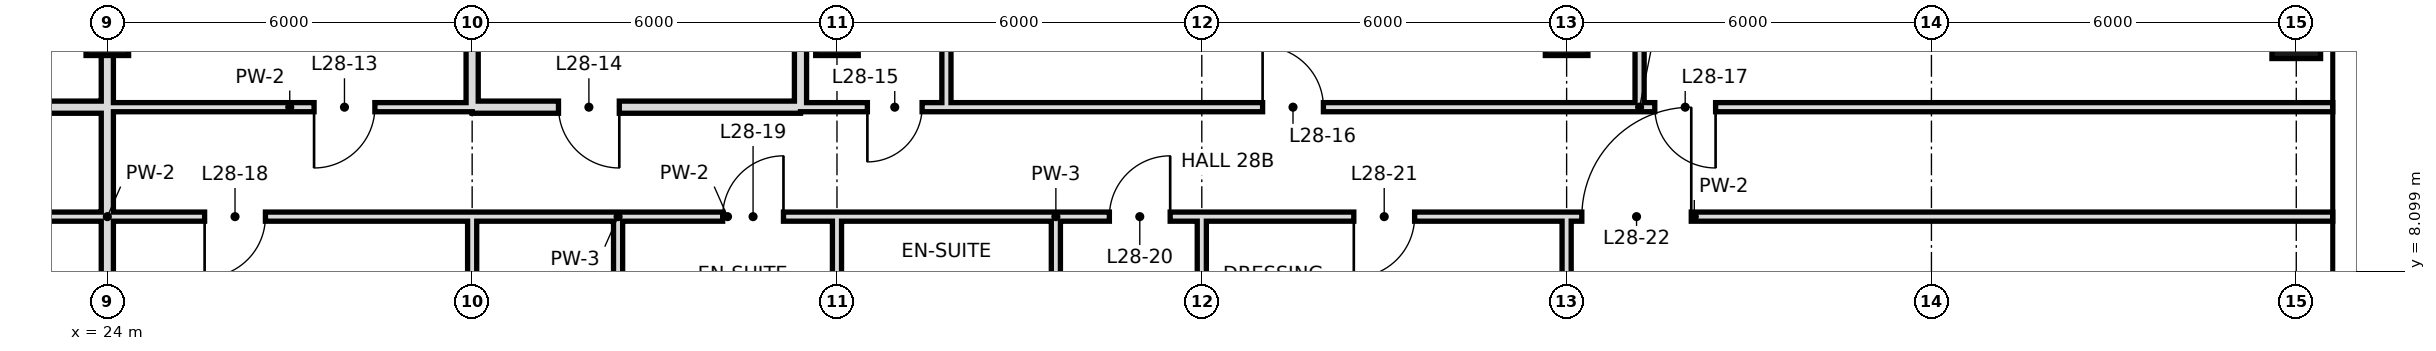
"""IFC4 building model, lengths in metres.
Left out: names, types, materials, properties, quantities, classifications, styles, units other than length and angle.
Written with IfcOpenShell. Run it as: python <this file> out.ifc"""

import sys

from ifc_helpers import new_model, si_unit, direction, frame, frame_2d, origin, origin_2d, place, context, subcontext, project, spatial, rectangle, hollow_rectangle, extrude, element, fill, save


model = new_model("IFC4")
c1 = context("Model", 3, precision=1e-05, world=origin(), true_north=direction((0.0, 1.0)))
c2 = subcontext(c1, "Body", "Model", "MODEL_VIEW")
j1 = project(units=[si_unit("LENGTHUNIT", "METRE"), si_unit("PLANEANGLEUNIT", "RADIAN")], contexts=[c1])
p1 = place(None, origin())
s1 = spatial("IfcSite", under=j1, at=p1, CompositionType="ELEMENT")
p2 = place(p1, origin())
s2 = spatial("IfcBuilding", under=s1, at=p2, CompositionType="ELEMENT")
p3 = place(p2, frame((0.0, 0.0, 126.8)))
s3 = spatial("IfcBuildingStorey", under=s2, at=p3, CompositionType="ELEMENT", Elevation=126.8)
for number, where, z_axis, x_axis in (
    (1, (24.0, 12.0, 0.0), (0.0, 0.0, 1.0), (1.0, 0.0, 0.0)),
    (2, (36.0, 12.0, 0.0), (0.0, 0.0, 1.0), (1.0, 0.0, 0.0)),
    (3, (48.0, 12.0, 0.0), (0.0, 0.0, 1.0), (1.0, 0.0, 0.0)),
):
    element("IfcColumn", number, at=place(p3, frame(where, z_axis=z_axis, x_axis=x_axis)), inside=s3, PredefinedType="COLUMN", context=c2, shape_type="SweptSolid", body=[
        extrude(hollow_rectangle(XDim=0.7, YDim=0.7, WallThickness=0.036, at=origin_2d()), origin(), (0.0, 0.0, 1.0), 3.6),
    ])
p4 = place(p3, frame((60.0, 12.0, 0.0), z_axis=(0.0, 0.0, 1.0), x_axis=(1.0, 0.0, 0.0)))
e4 = element("IfcColumn", 4, at=p4, inside=s3, PredefinedType="COLUMN", context=c2, shape_type="SweptSolid", body=[
    extrude(hollow_rectangle(XDim=0.8, YDim=0.8, WallThickness=0.04, at=origin_2d()), origin(), (0.0, 0.0, 1.0), 3.6),
])
p5 = place(p3, frame((24.0, 10.8, 0.0), z_axis=(0.0, 0.0, 1.0), x_axis=(0.0, 1.0, 0.0)))
e5 = element("IfcWall", 5, at=p5, inside=s3, PredefinedType="SOLIDWALL", context=c2, shape_type="SweptSolid", body=[
    extrude(rectangle(XDim=7.9, YDim=0.2, at=frame_2d((3.95, 0.0))), origin(), (0.0, 0.0, 1.0), 2.72),
])
p6 = place(p3, frame((24.0, 0.0, 0.0), z_axis=(0.0, 0.0, 1.0), x_axis=(0.0, 1.0, 0.0)))
e6 = element("IfcWall", 6, at=p6, inside=s3, PredefinedType="SOLIDWALL", context=c2, shape_type="SweptSolid", body=[
    extrude(rectangle(XDim=10.8, YDim=0.2, at=frame_2d((5.4, 0.0))), origin(), (0.0, 0.0, 1.0), 2.72),
])
p7 = place(p3, frame((30.0, 10.8, 0.0), z_axis=(0.0, 0.0, 1.0), x_axis=(0.0, 1.0, 0.0)))
e7 = element("IfcWall", 7, at=p7, inside=s3, PredefinedType="SOLIDWALL", context=c2, shape_type="SweptSolid", body=[
    extrude(rectangle(XDim=7.9, YDim=0.2, at=frame_2d((3.95, 0.0))), origin(), (0.0, 0.0, 1.0), 2.72),
])
p8 = place(p3, frame((30.0, 6.0, 0.0), z_axis=(0.0, 0.0, 1.0), x_axis=(0.0, 1.0, 0.0)))
e8 = element("IfcWall", 8, at=p8, inside=s3, PredefinedType="PARTITIONING", context=c2, shape_type="SweptSolid", body=[
    extrude(rectangle(XDim=3.0, YDim=0.15, at=frame_2d((1.5, 0.0))), origin(), (0.0, 0.0, 1.0), 2.72),
])
p9 = place(p3, frame((32.4, 6.0, 0.0), z_axis=(0.0, 0.0, 1.0), x_axis=(0.0, 1.0, 0.0)))
e9 = element("IfcWall", 9, at=p9, inside=s3, PredefinedType="PARTITIONING", context=c2, shape_type="SweptSolid", body=[
    extrude(rectangle(XDim=3.0, YDim=0.15, at=frame_2d((1.5, 0.0))), origin(), (0.0, 0.0, 1.0), 3.42),
])
p10 = place(p3, frame((35.4, 10.8, 0.0), z_axis=(0.0, 0.0, 1.0), x_axis=(0.0, 1.0, 0.0)))
e10 = element("IfcWall", 10, at=p10, inside=s3, PredefinedType="SOLIDWALL", context=c2, shape_type="SweptSolid", body=[
    extrude(rectangle(XDim=7.9, YDim=0.2, at=frame_2d((3.95, 0.0))), origin(), (0.0, 0.0, 1.0), 2.72),
])
p11 = place(p3, frame((36.0, 6.0, 0.0), z_axis=(0.0, 0.0, 1.0), x_axis=(0.0, 1.0, 0.0)))
e11 = element("IfcWall", 11, at=p11, inside=s3, PredefinedType="PARTITIONING", context=c2, shape_type="SweptSolid", body=[
    extrude(rectangle(XDim=3.0, YDim=0.15, at=frame_2d((1.5, 0.0))), origin(), (0.0, 0.0, 1.0), 2.72),
])
p12 = place(p3, frame((37.8, 10.8, 0.0), z_axis=(0.0, 0.0, 1.0), x_axis=(0.0, 1.0, 0.0)))
e12 = element("IfcWall", 12, at=p12, inside=s3, PredefinedType="PARTITIONING", context=c2, shape_type="SweptSolid", body=[
    extrude(rectangle(XDim=7.9, YDim=0.15, at=frame_2d((3.95, 0.0))), origin(), (0.0, 0.0, 1.0), 3.42),
])
p13 = place(p3, frame((39.6, 6.0, 0.0), z_axis=(0.0, 0.0, 1.0), x_axis=(0.0, 1.0, 0.0)))
e13 = element("IfcWall", 13, at=p13, inside=s3, PredefinedType="PARTITIONING", context=c2, shape_type="SweptSolid", body=[
    extrude(rectangle(XDim=3.0, YDim=0.15, at=frame_2d((1.5, 0.0))), origin(), (0.0, 0.0, 1.0), 3.42),
])
p14 = place(p3, frame((42.0, -0.6, 0.0), z_axis=(0.0, 0.0, 1.0), x_axis=(0.0, 1.0, 0.0)))
e14 = element("IfcWall", 14, at=p14, inside=s3, PredefinedType="PARTITIONING", context=c2, shape_type="SweptSolid", body=[
    extrude(rectangle(XDim=9.6, YDim=0.15, at=frame_2d((4.8, 0.0))), origin(), (0.0, 0.0, 1.0), 2.72),
])
p15 = place(p3, frame((48.0, 0.0, 0.0), z_axis=(0.0, 0.0, 1.0), x_axis=(0.0, 1.0, 0.0)))
e15 = element("IfcWall", 15, at=p15, inside=s3, PredefinedType="PARTITIONING", context=c2, shape_type="SweptSolid", body=[
    extrude(rectangle(XDim=9.0, YDim=0.15, at=frame_2d((4.5, 0.0))), origin(), (0.0, 0.0, 1.0), 2.72),
])
p16 = place(p3, frame((49.2, 10.8, 0.0), z_axis=(0.0, 0.0, 1.0), x_axis=(0.0, 1.0, 0.0)))
e16 = element("IfcWall", 16, at=p16, inside=s3, PredefinedType="PARTITIONING", context=c2, shape_type="SweptSolid", body=[
    extrude(rectangle(XDim=20.4, YDim=0.15, at=frame_2d((10.2, 0.0))), origin(), (0.0, 0.0, 1.0), 3.42),
])
p17 = place(p16, frame((17.68, 0.0, 0.0)))
e17 = element("IfcOpeningElement", 17, at=p17, cuts=e16, PredefinedType="OPENING", context=c2, shape_type="SweptSolid", body=[
    extrude(rectangle(XDim=1.0, YDim=2.4, at=frame_2d((0.5, 1.2))), frame((0.0, 0.085, 0.0), z_axis=(0.0, -1.0, 0.0), x_axis=(1.0, 0.0, 0.0)), (0.0, 0.0, 1.0), 0.17),
])
p18 = place(p16, frame((9.88, 0.0, 0.0)))
e18 = element("IfcOpeningElement", 18, at=p18, cuts=e16, PredefinedType="OPENING", context=c2, shape_type="SweptSolid", body=[
    extrude(rectangle(XDim=1.0, YDim=2.4, at=frame_2d((0.5, 1.2))), frame((0.0, 0.085, 0.0), z_axis=(0.0, -1.0, 0.0), x_axis=(1.0, 0.0, 0.0)), (0.0, 0.0, 1.0), 0.17),
])
p19 = place(p3, frame((18.6, 10.8, 0.0), z_axis=(0.0, 0.0, 1.0), x_axis=(1.0, 0.0, 0.0)))
e19 = element("IfcWall", 19, at=p19, inside=s3, PredefinedType="SOLIDWALL", context=c2, shape_type="SweptSolid", body=[
    extrude(rectangle(XDim=5.4, YDim=0.2, at=frame_2d((2.7, 0.0))), origin(), (0.0, 0.0, 1.0), 2.72),
])
p20 = place(p19, frame((2.2, 0.0, 0.0)))
e20 = element("IfcOpeningElement", 20, at=p20, cuts=e19, PredefinedType="OPENING", context=c2, shape_type="SweptSolid", body=[
    extrude(rectangle(XDim=1.0, YDim=2.4, at=frame_2d((0.5, 1.2))), frame((0.0, 0.11, 0.0), z_axis=(0.0, -1.0, 0.0), x_axis=(1.0, 0.0, 0.0)), (0.0, 0.0, 1.0), 0.22),
])
p21 = place(p3, frame((30.0, 10.8, 0.0), z_axis=(0.0, 0.0, 1.0), x_axis=(1.0, 0.0, 0.0)))
e21 = element("IfcWall", 21, at=p21, inside=s3, PredefinedType="SOLIDWALL", context=c2, shape_type="SweptSolid", body=[
    extrude(rectangle(XDim=5.4, YDim=0.2, at=frame_2d((2.7, 0.0))), origin(), (0.0, 0.0, 1.0), 2.72),
])
p22 = place(p21, frame((1.42, 0.0, 0.0)))
e22 = element("IfcOpeningElement", 22, at=p22, cuts=e21, PredefinedType="OPENING", context=c2, shape_type="SweptSolid", body=[
    extrude(rectangle(XDim=1.0, YDim=2.4, at=frame_2d((0.5, 1.2))), frame((0.0, 0.11, 0.0), z_axis=(0.0, -1.0, 0.0), x_axis=(1.0, 0.0, 0.0)), (0.0, 0.0, 1.0), 0.22),
])
p23 = place(p3, frame((24.0, 10.8, 0.0), z_axis=(0.0, 0.0, 1.0), x_axis=(1.0, 0.0, 0.0)))
e23 = element("IfcWall", 23, at=p23, inside=s3, PredefinedType="PARTITIONING", context=c2, shape_type="SweptSolid", body=[
    extrude(rectangle(XDim=6.0, YDim=0.15, at=frame_2d((3.0, 0.0))), origin(), (0.0, 0.0, 1.0), 3.42),
])
p24 = place(p23, frame((3.4, 0.0, 0.0)))
e24 = element("IfcOpeningElement", 24, at=p24, cuts=e23, PredefinedType="OPENING", context=c2, shape_type="SweptSolid", body=[
    extrude(rectangle(XDim=1.0, YDim=2.4, at=frame_2d((0.5, 1.2))), frame((0.0, 0.085, 0.0), z_axis=(0.0, -1.0, 0.0), x_axis=(1.0, 0.0, 0.0)), (0.0, 0.0, 1.0), 0.17),
])
p25 = place(p3, frame((37.8, 10.8, 0.0), z_axis=(0.0, 0.0, 1.0), x_axis=(1.0, 0.0, 0.0)))
e25 = element("IfcWall", 25, at=p25, inside=s3, PredefinedType="PARTITIONING", context=c2, shape_type="SweptSolid", body=[
    extrude(rectangle(XDim=22.8, YDim=0.15, at=frame_2d((11.4, 0.0))), origin(), (0.0, 0.0, 1.0), 3.42),
])
p26 = place(p25, frame((5.2, 0.0, 0.0)))
e26 = element("IfcOpeningElement", 26, at=p26, cuts=e25, PredefinedType="OPENING", context=c2, shape_type="SweptSolid", body=[
    extrude(rectangle(XDim=1.0, YDim=2.4, at=frame_2d((0.5, 1.2))), frame((0.0, 0.085, 0.0), z_axis=(0.0, -1.0, 0.0), x_axis=(1.0, 0.0, 0.0)), (0.0, 0.0, 1.0), 0.17),
])
p27 = place(p25, frame((11.65, 0.0, 0.0)))
e27 = element("IfcOpeningElement", 27, at=p27, cuts=e25, PredefinedType="OPENING", context=c2, shape_type="SweptSolid", body=[
    extrude(rectangle(XDim=1.0, YDim=2.4, at=frame_2d((0.5, 1.2))), frame((0.0, 0.085, 0.0), z_axis=(0.0, -1.0, 0.0), x_axis=(1.0, 0.0, 0.0)), (0.0, 0.0, 1.0), 0.17),
])
p28 = place(p3, frame((35.4, 10.8, 0.0), z_axis=(0.0, 0.0, 1.0), x_axis=(1.0, 0.0, 0.0)))
e28 = element("IfcWall", 28, at=p28, inside=s3, PredefinedType="PARTITIONING", context=c2, shape_type="SweptSolid", body=[
    extrude(rectangle(XDim=2.4, YDim=0.15, at=frame_2d((1.2, 0.0))), origin(), (0.0, 0.0, 1.0), 3.42),
])
p29 = place(p28, frame((1.1, 0.0, 0.0)))
e29 = element("IfcOpeningElement", 29, at=p29, cuts=e28, PredefinedType="OPENING", context=c2, shape_type="SweptSolid", body=[
    extrude(rectangle(XDim=0.9, YDim=2.4, at=frame_2d((0.45, 1.2))), frame((0.0, 0.085, 0.0), z_axis=(0.0, -1.0, 0.0), x_axis=(1.0, 0.0, 0.0)), (0.0, 0.0, 1.0), 0.17),
])
p30 = place(p3, frame((18.0, 9.0, 0.0), z_axis=(0.0, 0.0, 1.0), x_axis=(1.0, 0.0, 0.0)))
e30 = element("IfcWall", 30, at=p30, inside=s3, PredefinedType="PARTITIONING", context=c2, shape_type="SweptSolid", body=[
    extrude(rectangle(XDim=12.0, YDim=0.15, at=frame_2d((6.0, 0.0))), origin(), (0.0, 0.0, 1.0), 3.42),
])
p31 = place(p30, frame((2.1, 0.0, 0.0)))
e31 = element("IfcOpeningElement", 31, at=p31, cuts=e30, PredefinedType="OPENING", context=c2, shape_type="SweptSolid", body=[
    extrude(rectangle(XDim=1.8, YDim=2.4, at=frame_2d((0.9, 1.2))), frame((0.0, 0.085, 0.0), z_axis=(0.0, -1.0, 0.0), x_axis=(1.0, 0.0, 0.0)), (0.0, 0.0, 1.0), 0.17),
])
p32 = place(p30, frame((7.6, 0.0, 0.0)))
e32 = element("IfcOpeningElement", 32, at=p32, cuts=e30, PredefinedType="OPENING", context=c2, shape_type="SweptSolid", body=[
    extrude(rectangle(XDim=1.0, YDim=2.4, at=frame_2d((0.5, 1.2))), frame((0.0, 0.085, 0.0), z_axis=(0.0, -1.0, 0.0), x_axis=(1.0, 0.0, 0.0)), (0.0, 0.0, 1.0), 0.17),
])
p33 = place(p3, frame((32.4, 9.0, 0.0), z_axis=(0.0, 0.0, 1.0), x_axis=(1.0, 0.0, 0.0)))
e33 = element("IfcWall", 33, at=p33, inside=s3, PredefinedType="PARTITIONING", context=c2, shape_type="SweptSolid", body=[
    extrude(rectangle(XDim=3.6, YDim=0.15, at=frame_2d((1.8, 0.0))), origin(), (0.0, 0.0, 1.0), 3.42),
])
p34 = place(p33, frame((1.72, 0.0, 0.0)))
e34 = element("IfcOpeningElement", 34, at=p34, cuts=e33, PredefinedType="OPENING", context=c2, shape_type="SweptSolid", body=[
    extrude(rectangle(XDim=1.0, YDim=2.4, at=frame_2d((0.5, 1.2))), frame((0.0, 0.085, 0.0), z_axis=(0.0, -1.0, 0.0), x_axis=(1.0, 0.0, 0.0)), (0.0, 0.0, 1.0), 0.17),
])
p35 = place(p3, frame((39.6, 9.0, 0.0), z_axis=(0.0, 0.0, 1.0), x_axis=(1.0, 0.0, 0.0)))
e35 = element("IfcWall", 35, at=p35, inside=s3, PredefinedType="PARTITIONING", context=c2, shape_type="SweptSolid", body=[
    extrude(rectangle(XDim=21.0, YDim=0.15, at=frame_2d((10.5, 0.0))), origin(), (0.0, 0.0, 1.0), 3.42),
])
p36 = place(p35, frame((0.88, 0.0, 0.0)))
e36 = element("IfcOpeningElement", 36, at=p36, cuts=e35, PredefinedType="OPENING", context=c2, shape_type="SweptSolid", body=[
    extrude(rectangle(XDim=1.0, YDim=2.4, at=frame_2d((0.5, 1.2))), frame((0.0, 0.085, 0.0), z_axis=(0.0, -1.0, 0.0), x_axis=(1.0, 0.0, 0.0)), (0.0, 0.0, 1.0), 0.17),
])
p37 = place(p35, frame((4.9, 0.0, 0.0)))
e37 = element("IfcOpeningElement", 37, at=p37, cuts=e35, PredefinedType="OPENING", context=c2, shape_type="SweptSolid", body=[
    extrude(rectangle(XDim=1.0, YDim=2.4, at=frame_2d((0.5, 1.2))), frame((0.0, 0.085, 0.0), z_axis=(0.0, -1.0, 0.0), x_axis=(1.0, 0.0, 0.0)), (0.0, 0.0, 1.0), 0.17),
])
p38 = place(p35, frame((8.65, 0.0, 0.0)))
e38 = element("IfcOpeningElement", 38, at=p38, cuts=e35, PredefinedType="OPENING", context=c2, shape_type="SweptSolid", body=[
    extrude(rectangle(XDim=1.8, YDim=2.4, at=frame_2d((0.9, 1.2))), frame((0.0, 0.085, 0.0), z_axis=(0.0, -1.0, 0.0), x_axis=(1.0, 0.0, 0.0)), (0.0, 0.0, 1.0), 0.17),
])
p39 = place(p3, frame((30.0, 9.0, 0.0), z_axis=(0.0, 0.0, 1.0), x_axis=(1.0, 0.0, 0.0)))
e39 = element("IfcWall", 39, at=p39, inside=s3, PredefinedType="PARTITIONING", context=c2, shape_type="SweptSolid", body=[
    extrude(rectangle(XDim=2.4, YDim=0.15, at=frame_2d((1.2, 0.0))), origin(), (0.0, 0.0, 1.0), 3.42),
])
p40 = place(p3, frame((36.0, 9.0, 0.0), z_axis=(0.0, 0.0, 1.0), x_axis=(1.0, 0.0, 0.0)))
e40 = element("IfcWall", 40, at=p40, inside=s3, PredefinedType="PARTITIONING", context=c2, shape_type="SweptSolid", body=[
    extrude(rectangle(XDim=3.6, YDim=0.15, at=frame_2d((1.8, 0.0))), origin(), (0.0, 0.0, 1.0), 3.42),
])
p41 = place(p24, frame((1.0, 0.0, 0.0), z_axis=(0.0, 0.0, 1.0), x_axis=(-1.0, 0.0, 0.0)))
e41 = element("IfcDoor", 41, at=p41, inside=s3, OperationType="SINGLE_SWING_RIGHT", PredefinedType="DOOR", context=c2, shape_type="SweptSolid", body=[
    extrude(rectangle(XDim=1.0, YDim=2.4, at=frame_2d((0.5, 1.2))), frame((0.0, 0.025, 0.0), z_axis=(0.0, -1.0, 0.0), x_axis=(1.0, 0.0, 0.0)), (0.0, 0.0, 1.0), 0.05),
])
fill(e24, e41)
p42 = place(p22, origin())
e42 = element("IfcDoor", 42, at=p42, inside=s3, OperationType="SINGLE_SWING_RIGHT", PredefinedType="DOOR", context=c2, shape_type="SweptSolid", body=[
    extrude(rectangle(XDim=1.0, YDim=2.4, at=frame_2d((0.5, 1.2))), frame((0.0, 0.025, 0.0), z_axis=(0.0, -1.0, 0.0), x_axis=(1.0, 0.0, 0.0)), (0.0, 0.0, 1.0), 0.05),
])
fill(e22, e42)
p43 = place(p29, frame((0.9, 0.0, 0.0), z_axis=(0.0, 0.0, 1.0), x_axis=(-1.0, 0.0, 0.0)))
e43 = element("IfcDoor", 43, at=p43, inside=s3, OperationType="SINGLE_SWING_RIGHT", PredefinedType="DOOR", context=c2, shape_type="SweptSolid", body=[
    extrude(rectangle(XDim=0.9, YDim=2.4, at=frame_2d((0.45, 1.2))), frame((0.0, 0.025, 0.0), z_axis=(0.0, -1.0, 0.0), x_axis=(1.0, 0.0, 0.0)), (0.0, 0.0, 1.0), 0.05),
])
fill(e29, e43)
p44 = place(p26, origin())
e44 = element("IfcDoor", 44, at=p44, inside=s3, OperationType="SINGLE_SWING_LEFT", PredefinedType="DOOR", context=c2, shape_type="SweptSolid", body=[
    extrude(rectangle(XDim=1.0, YDim=2.4, at=frame_2d((0.5, 1.2))), frame((0.0, 0.025, 0.0), z_axis=(0.0, -1.0, 0.0), x_axis=(1.0, 0.0, 0.0)), (0.0, 0.0, 1.0), 0.05),
])
fill(e26, e44)
p45 = place(p27, origin())
e45 = element("IfcDoor", 45, at=p45, inside=s3, OperationType="SINGLE_SWING_RIGHT", PredefinedType="DOOR", context=c2, shape_type="SweptSolid", body=[
    extrude(rectangle(XDim=1.0, YDim=2.4, at=frame_2d((0.5, 1.2))), frame((0.0, 0.025, 0.0), z_axis=(0.0, -1.0, 0.0), x_axis=(1.0, 0.0, 0.0)), (0.0, 0.0, 1.0), 0.05),
])
fill(e27, e45)
p46 = place(p32, frame((1.0, 0.0, 0.0), z_axis=(0.0, 0.0, 1.0), x_axis=(-1.0, 0.0, 0.0)))
e46 = element("IfcDoor", 46, at=p46, inside=s3, OperationType="SINGLE_SWING_RIGHT", PredefinedType="DOOR", context=c2, shape_type="SweptSolid", body=[
    extrude(rectangle(XDim=1.0, YDim=2.4, at=frame_2d((0.5, 1.2))), frame((0.0, 0.025, 0.0), z_axis=(0.0, -1.0, 0.0), x_axis=(1.0, 0.0, 0.0)), (0.0, 0.0, 1.0), 0.05),
])
fill(e32, e46)
p47 = place(p34, frame((1.0, 0.0, 0.0), z_axis=(0.0, 0.0, 1.0), x_axis=(-1.0, 0.0, 0.0)))
e47 = element("IfcDoor", 47, at=p47, inside=s3, OperationType="SINGLE_SWING_LEFT", PredefinedType="DOOR", context=c2, shape_type="SweptSolid", body=[
    extrude(rectangle(XDim=1.0, YDim=2.4, at=frame_2d((0.5, 1.2))), frame((0.0, 0.025, 0.0), z_axis=(0.0, -1.0, 0.0), x_axis=(1.0, 0.0, 0.0)), (0.0, 0.0, 1.0), 0.05),
])
fill(e34, e47)
p48 = place(p36, frame((1.0, 0.0, 0.0), z_axis=(0.0, 0.0, 1.0), x_axis=(-1.0, 0.0, 0.0)))
e48 = element("IfcDoor", 48, at=p48, inside=s3, OperationType="SINGLE_SWING_LEFT", PredefinedType="DOOR", context=c2, shape_type="SweptSolid", body=[
    extrude(rectangle(XDim=1.0, YDim=2.4, at=frame_2d((0.5, 1.2))), frame((0.0, 0.025, 0.0), z_axis=(0.0, -1.0, 0.0), x_axis=(1.0, 0.0, 0.0)), (0.0, 0.0, 1.0), 0.05),
])
fill(e36, e48)
p49 = place(p37, frame((1.0, 0.0, 0.0), z_axis=(0.0, 0.0, 1.0), x_axis=(-1.0, 0.0, 0.0)))
e49 = element("IfcDoor", 49, at=p49, inside=s3, OperationType="SINGLE_SWING_RIGHT", PredefinedType="DOOR", context=c2, shape_type="SweptSolid", body=[
    extrude(rectangle(XDim=1.0, YDim=2.4, at=frame_2d((0.5, 1.2))), frame((0.0, 0.025, 0.0), z_axis=(0.0, -1.0, 0.0), x_axis=(1.0, 0.0, 0.0)), (0.0, 0.0, 1.0), 0.05),
])
fill(e37, e49)
p50 = place(p38, frame((1.8, 0.0, 0.0), z_axis=(0.0, 0.0, 1.0), x_axis=(-1.0, 0.0, 0.0)))
e50 = element("IfcDoor", 50, at=p50, inside=s3, OperationType="SINGLE_SWING_LEFT", PredefinedType="DOOR", context=c2, shape_type="SweptSolid", body=[
    extrude(rectangle(XDim=1.8, YDim=2.4, at=frame_2d((0.9, 1.2))), frame((0.0, 0.025, 0.0), z_axis=(0.0, -1.0, 0.0), x_axis=(1.0, 0.0, 0.0)), (0.0, 0.0, 1.0), 0.05),
])
fill(e38, e50)
save(model, sys.argv[1])
